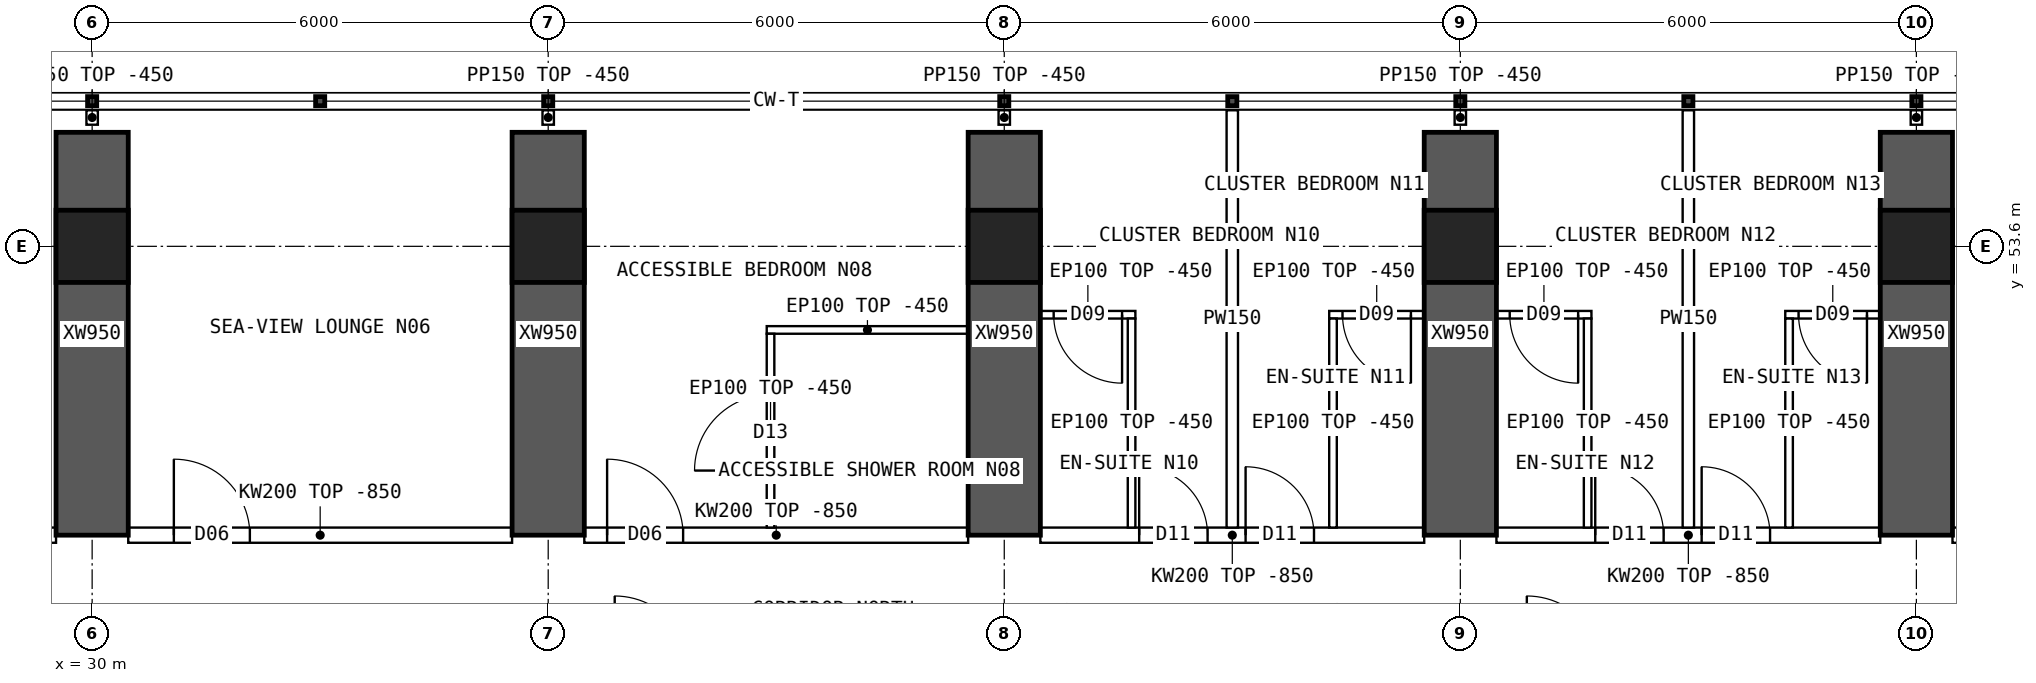
"""IFC4 building model, lengths in metres.
Left out: names, types, materials, properties, quantities, classifications, styles, units other than length and angle.
Written with IfcOpenShell. Run it as: python <this file> out.ifc"""

import sys

from ifc_helpers import new_model, si_unit, direction, frame, frame_2d, origin, origin_2d, place, context, subcontext, project, spatial, polyline, rectangle, hollow_rectangle, outline, extrude, element, fill, save


model = new_model("IFC4")
c1 = context("Model", 3, precision=1e-05, world=origin(), true_north=direction((0.0, 1.0)))
c2 = subcontext(c1, "Body", "Model", "MODEL_VIEW")
j1 = project(units=[si_unit("LENGTHUNIT", "METRE"), si_unit("PLANEANGLEUNIT", "RADIAN")], contexts=[c1])
p1 = place(None, origin())
s1 = spatial("IfcSite", under=j1, at=p1, CompositionType="ELEMENT")
p2 = place(p1, origin())
s2 = spatial("IfcBuilding", under=s1, at=p2, CompositionType="ELEMENT")
p3 = place(p2, frame((0.0, 0.0, 110.65)))
s3 = spatial("IfcBuildingStorey", under=s2, at=p3, CompositionType="ELEMENT", Elevation=110.65)
for number, where, z_axis, x_axis in (
    (1, (30.0, 53.6, 0.0), (0.0, 0.0, 1.0), (1.0, 0.0, 0.0)),
    (2, (36.0, 53.6, 0.0), (0.0, 0.0, 1.0), (1.0, 0.0, 0.0)),
    (3, (42.0, 53.6, 0.0), (0.0, 0.0, 1.0), (1.0, 0.0, 0.0)),
    (4, (48.0, 53.6, 0.0), (0.0, 0.0, 1.0), (1.0, 0.0, 0.0)),
    (5, (54.0, 53.6, 0.0), (0.0, 0.0, 1.0), (1.0, 0.0, 0.0)),
):
    element("IfcColumn", number, at=place(p3, frame(where, z_axis=z_axis, x_axis=x_axis)), inside=s3, PredefinedType="COLUMN", context=c2, shape_type="SweptSolid", body=[
        extrude(hollow_rectangle(XDim=0.95, YDim=0.95, WallThickness=0.095, at=origin_2d()), origin(), (0.0, 0.0, 1.0), 3.75),
    ])
for number, where, z_axis, x_axis in (
    (6, (30.0, 49.8, 0.0), (0.0, 0.0, 1.0), (0.0, 1.0, 0.0)),
    (7, (36.0, 49.8, 0.0), (0.0, 0.0, 1.0), (0.0, 1.0, 0.0)),
    (8, (42.0, 49.8, 0.0), (0.0, 0.0, 1.0), (0.0, 1.0, 0.0)),
    (9, (48.0, 49.8, 0.0), (0.0, 0.0, 1.0), (0.0, 1.0, 0.0)),
    (10, (54.0, 49.8, 0.0), (0.0, 0.0, 1.0), (0.0, 1.0, 0.0)),
):
    element("IfcWall", number, at=place(p3, frame(where, z_axis=z_axis, x_axis=x_axis)), inside=s3, PredefinedType="SHEAR", context=c2, shape_type="SweptSolid", body=[
        extrude(rectangle(XDim=5.3, YDim=0.95, at=frame_2d((2.65, 0.0))), origin(), (0.0, 0.0, 1.0), 3.75),
    ])
p4 = place(p3, frame((24.475, 49.8, 0.0), z_axis=(0.0, 0.0, 1.0), x_axis=(1.0, 0.0, 0.0)))
e11 = element("IfcWall", 11, at=p4, inside=s3, PredefinedType="SOLIDWALL", context=c2, shape_type="SweptSolid", body=[
    extrude(outline(polyline([(0.0, 0.0), (5.05, 0.0), (5.05, 2.9), (0.0, 2.9), (0.0, 0.0)])), frame((0.0, 0.1, 0.0), z_axis=(0.0, -1.0, 0.0), x_axis=(1.0, 0.0, 0.0)), (0.0, 0.0, 1.0), 0.2),
])
p5 = place(p4, frame((0.6, 0.0, 0.0)))
e12 = element("IfcOpeningElement", 12, at=p5, cuts=e11, PredefinedType="OPENING", context=c2, shape_type="SweptSolid", body=[
    extrude(rectangle(XDim=1.0, YDim=2.1, at=frame_2d((0.5, 1.05))), frame((0.0, 0.11, 0.0), z_axis=(0.0, -1.0, 0.0), x_axis=(1.0, 0.0, 0.0)), (0.0, 0.0, 1.0), 0.22),
])
p6 = place(p3, frame((30.475, 49.8, 0.0), z_axis=(0.0, 0.0, 1.0), x_axis=(1.0, 0.0, 0.0)))
e13 = element("IfcWall", 13, at=p6, inside=s3, PredefinedType="SOLIDWALL", context=c2, shape_type="SweptSolid", body=[
    extrude(outline(polyline([(0.0, 0.0), (5.05, 0.0), (5.05, 2.9), (0.0, 2.9), (0.0, 0.0)])), frame((0.0, 0.1, 0.0), z_axis=(0.0, -1.0, 0.0), x_axis=(1.0, 0.0, 0.0)), (0.0, 0.0, 1.0), 0.2),
])
p7 = place(p6, frame((0.6, 0.0, 0.0)))
e14 = element("IfcOpeningElement", 14, at=p7, cuts=e13, PredefinedType="OPENING", context=c2, shape_type="SweptSolid", body=[
    extrude(rectangle(XDim=1.0, YDim=2.1, at=frame_2d((0.5, 1.05))), frame((0.0, 0.11, 0.0), z_axis=(0.0, -1.0, 0.0), x_axis=(1.0, 0.0, 0.0)), (0.0, 0.0, 1.0), 0.22),
])
p8 = place(p3, frame((36.475, 49.8, 0.0), z_axis=(0.0, 0.0, 1.0), x_axis=(1.0, 0.0, 0.0)))
e15 = element("IfcWall", 15, at=p8, inside=s3, PredefinedType="SOLIDWALL", context=c2, shape_type="SweptSolid", body=[
    extrude(outline(polyline([(0.0, 0.0), (5.05, 0.0), (5.05, 2.9), (0.0, 2.9), (0.0, 0.0)])), frame((0.0, 0.1, 0.0), z_axis=(0.0, -1.0, 0.0), x_axis=(1.0, 0.0, 0.0)), (0.0, 0.0, 1.0), 0.2),
])
p9 = place(p8, frame((0.3, 0.0, 0.0)))
e16 = element("IfcOpeningElement", 16, at=p9, cuts=e15, PredefinedType="OPENING", context=c2, shape_type="SweptSolid", body=[
    extrude(rectangle(XDim=1.0, YDim=2.1, at=frame_2d((0.5, 1.05))), frame((0.0, 0.11, 0.0), z_axis=(0.0, -1.0, 0.0), x_axis=(1.0, 0.0, 0.0)), (0.0, 0.0, 1.0), 0.22),
])
p10 = place(p3, frame((42.475, 49.8, 0.0), z_axis=(0.0, 0.0, 1.0), x_axis=(1.0, 0.0, 0.0)))
e17 = element("IfcWall", 17, at=p10, inside=s3, PredefinedType="SOLIDWALL", context=c2, shape_type="SweptSolid", body=[
    extrude(outline(polyline([(0.0, 0.0), (5.05, 0.0), (5.05, 2.9), (0.0, 2.9), (0.0, 0.0)])), frame((0.0, 0.1, 0.0), z_axis=(0.0, -1.0, 0.0), x_axis=(1.0, 0.0, 0.0)), (0.0, 0.0, 1.0), 0.2),
])
p11 = place(p10, frame((1.3, 0.0, 0.0)))
e18 = element("IfcOpeningElement", 18, at=p11, cuts=e17, PredefinedType="OPENING", context=c2, shape_type="SweptSolid", body=[
    extrude(rectangle(XDim=0.9, YDim=2.1, at=frame_2d((0.45, 1.05))), frame((0.0, 0.11, 0.0), z_axis=(0.0, -1.0, 0.0), x_axis=(1.0, 0.0, 0.0)), (0.0, 0.0, 1.0), 0.22),
])
p12 = place(p10, frame((2.7, 0.0, 0.0)))
e19 = element("IfcOpeningElement", 19, at=p12, cuts=e17, PredefinedType="OPENING", context=c2, shape_type="SweptSolid", body=[
    extrude(rectangle(XDim=0.9, YDim=2.1, at=frame_2d((0.45, 1.05))), frame((0.0, 0.11, 0.0), z_axis=(0.0, -1.0, 0.0), x_axis=(1.0, 0.0, 0.0)), (0.0, 0.0, 1.0), 0.22),
])
p13 = place(p3, frame((48.475, 49.8, 0.0), z_axis=(0.0, 0.0, 1.0), x_axis=(1.0, 0.0, 0.0)))
e20 = element("IfcWall", 20, at=p13, inside=s3, PredefinedType="SOLIDWALL", context=c2, shape_type="SweptSolid", body=[
    extrude(outline(polyline([(0.0, 0.0), (5.05, 0.0), (5.05, 2.9), (0.0, 2.9), (0.0, 0.0)])), frame((0.0, 0.1, 0.0), z_axis=(0.0, -1.0, 0.0), x_axis=(1.0, 0.0, 0.0)), (0.0, 0.0, 1.0), 0.2),
])
p14 = place(p13, frame((1.3, 0.0, 0.0)))
e21 = element("IfcOpeningElement", 21, at=p14, cuts=e20, PredefinedType="OPENING", context=c2, shape_type="SweptSolid", body=[
    extrude(rectangle(XDim=0.9, YDim=2.1, at=frame_2d((0.45, 1.05))), frame((0.0, 0.11, 0.0), z_axis=(0.0, -1.0, 0.0), x_axis=(1.0, 0.0, 0.0)), (0.0, 0.0, 1.0), 0.22),
])
p15 = place(p13, frame((2.7, 0.0, 0.0)))
e22 = element("IfcOpeningElement", 22, at=p15, cuts=e20, PredefinedType="OPENING", context=c2, shape_type="SweptSolid", body=[
    extrude(rectangle(XDim=0.9, YDim=2.1, at=frame_2d((0.45, 1.05))), frame((0.0, 0.11, 0.0), z_axis=(0.0, -1.0, 0.0), x_axis=(1.0, 0.0, 0.0)), (0.0, 0.0, 1.0), 0.22),
])
p16 = place(p3, frame((54.475, 49.8, 0.0), z_axis=(0.0, 0.0, 1.0), x_axis=(1.0, 0.0, 0.0)))
e23 = element("IfcWall", 23, at=p16, inside=s3, PredefinedType="SOLIDWALL", context=c2, shape_type="SweptSolid", body=[
    extrude(outline(polyline([(0.0, 0.0), (5.05, 0.0), (5.05, 2.9), (0.0, 2.9), (0.0, 0.0)])), frame((0.0, 0.1, 0.0), z_axis=(0.0, -1.0, 0.0), x_axis=(1.0, 0.0, 0.0)), (0.0, 0.0, 1.0), 0.2),
])
p17 = place(p16, frame((0.6, 0.0, 0.0)))
e24 = element("IfcOpeningElement", 24, at=p17, cuts=e23, PredefinedType="OPENING", context=c2, shape_type="SweptSolid", body=[
    extrude(rectangle(XDim=1.0, YDim=2.1, at=frame_2d((0.5, 1.05))), frame((0.0, 0.11, 0.0), z_axis=(0.0, -1.0, 0.0), x_axis=(1.0, 0.0, 0.0)), (0.0, 0.0, 1.0), 0.22),
])
p18 = place(p3, frame((38.875, 52.5, 0.0), z_axis=(0.0, 0.0, 1.0), x_axis=(1.0, 0.0, 0.0)))
e25 = element("IfcWall", 25, at=p18, inside=s3, PredefinedType="PARTITIONING", context=c2, shape_type="SweptSolid", body=[
    extrude(rectangle(XDim=2.65, YDim=0.1, at=frame_2d((1.325, 0.0))), origin(), (0.0, 0.0, 1.0), 3.3),
])
p19 = place(p3, frame((38.925, 52.45, 0.0), z_axis=(0.0, 0.0, 1.0), x_axis=(0.0, -1.0, 0.0)))
e26 = element("IfcWall", 26, at=p19, inside=s3, PredefinedType="PARTITIONING", context=c2, shape_type="SweptSolid", body=[
    extrude(outline(polyline([(0.0, 0.0), (2.55, 0.0), (2.55, 2.9), (2.502, 2.9), (2.5, 3.3), (0.0, 3.3), (0.0, 0.0)])), frame((0.0, 0.05, 0.0), z_axis=(0.0, -1.0, 0.0), x_axis=(1.0, 0.0, 0.0)), (0.0, 0.0, 1.0), 0.1),
])
p20 = place(p19, frame((0.8, 0.0, 0.0)))
e27 = element("IfcOpeningElement", 27, at=p20, cuts=e26, PredefinedType="OPENING", context=c2, shape_type="SweptSolid", body=[
    extrude(rectangle(XDim=1.0, YDim=2.1, at=frame_2d((0.5, 1.05))), frame((0.0, 0.06, 0.0), z_axis=(0.0, -1.0, 0.0), x_axis=(1.0, 0.0, 0.0)), (0.0, 0.0, 1.0), 0.12),
])
p21 = place(p3, frame((45.0, 55.39, 0.0), z_axis=(0.0, 0.0, 1.0), x_axis=(0.0, -1.0, 0.0)))
e28 = element("IfcWall", 28, at=p21, inside=s3, PredefinedType="PARTITIONING", context=c2, shape_type="SweptSolid", body=[
    extrude(outline(polyline([(0.0, 0.0), (5.49, 0.0), (5.49, 2.9), (5.442, 2.9), (5.44, 3.3), (1.992, 3.3), (1.99, 2.9), (1.592, 2.9), (1.59, 3.3), (0.0, 3.3), (0.0, 0.0)])), frame((0.0, 0.075, 0.0), z_axis=(0.0, -1.0, 0.0), x_axis=(1.0, 0.0, 0.0)), (0.0, 0.0, 1.0), 0.15),
])
p22 = place(p3, frame((42.475, 52.7, 0.0), z_axis=(0.0, 0.0, 1.0), x_axis=(1.0, 0.0, 0.0)))
e29 = element("IfcWall", 29, at=p22, inside=s3, PredefinedType="PARTITIONING", context=c2, shape_type="SweptSolid", body=[
    extrude(rectangle(XDim=1.25, YDim=0.1, at=frame_2d((0.625, 0.0))), origin(), (0.0, 0.0, 1.0), 3.3),
])
p23 = place(p22, frame((0.175, 0.0, 0.0)))
e30 = element("IfcOpeningElement", 30, at=p23, cuts=e29, PredefinedType="OPENING", context=c2, shape_type="SweptSolid", body=[
    extrude(rectangle(XDim=0.9, YDim=2.1, at=frame_2d((0.45, 1.05))), frame((0.0, 0.06, 0.0), z_axis=(0.0, -1.0, 0.0), x_axis=(1.0, 0.0, 0.0)), (0.0, 0.0, 1.0), 0.12),
])
p24 = place(p3, frame((43.675, 52.65, 0.0), z_axis=(0.0, 0.0, 1.0), x_axis=(0.0, -1.0, 0.0)))
e31 = element("IfcWall", 31, at=p24, inside=s3, PredefinedType="PARTITIONING", context=c2, shape_type="SweptSolid", body=[
    extrude(outline(polyline([(0.0, 0.0), (2.75, 0.0), (2.75, 2.9), (2.702, 2.9), (2.7, 3.3), (0.0, 3.3), (0.0, 0.0)])), frame((0.0, 0.05, 0.0), z_axis=(0.0, -1.0, 0.0), x_axis=(1.0, 0.0, 0.0)), (0.0, 0.0, 1.0), 0.1),
])
p25 = place(p3, frame((46.275, 52.7, 0.0), z_axis=(0.0, 0.0, 1.0), x_axis=(1.0, 0.0, 0.0)))
e32 = element("IfcWall", 32, at=p25, inside=s3, PredefinedType="PARTITIONING", context=c2, shape_type="SweptSolid", body=[
    extrude(rectangle(XDim=1.25, YDim=0.1, at=frame_2d((0.625, 0.0))), origin(), (0.0, 0.0, 1.0), 3.3),
])
p26 = place(p25, frame((0.175, 0.0, 0.0)))
e33 = element("IfcOpeningElement", 33, at=p26, cuts=e32, PredefinedType="OPENING", context=c2, shape_type="SweptSolid", body=[
    extrude(rectangle(XDim=0.9, YDim=2.1, at=frame_2d((0.45, 1.05))), frame((0.0, 0.06, 0.0), z_axis=(0.0, -1.0, 0.0), x_axis=(1.0, 0.0, 0.0)), (0.0, 0.0, 1.0), 0.12),
])
p27 = place(p3, frame((46.325, 52.65, 0.0), z_axis=(0.0, 0.0, 1.0), x_axis=(0.0, -1.0, 0.0)))
e34 = element("IfcWall", 34, at=p27, inside=s3, PredefinedType="PARTITIONING", context=c2, shape_type="SweptSolid", body=[
    extrude(outline(polyline([(0.0, 0.0), (2.75, 0.0), (2.75, 2.9), (2.702, 2.9), (2.7, 3.3), (0.0, 3.3), (0.0, 0.0)])), frame((0.0, 0.05, 0.0), z_axis=(0.0, -1.0, 0.0), x_axis=(1.0, 0.0, 0.0)), (0.0, 0.0, 1.0), 0.1),
])
p28 = place(p3, frame((51.0, 55.39, 0.0), z_axis=(0.0, 0.0, 1.0), x_axis=(0.0, -1.0, 0.0)))
e35 = element("IfcWall", 35, at=p28, inside=s3, PredefinedType="PARTITIONING", context=c2, shape_type="SweptSolid", body=[
    extrude(outline(polyline([(0.0, 0.0), (5.49, 0.0), (5.49, 2.9), (5.442, 2.9), (5.44, 3.3), (1.992, 3.3), (1.99, 2.9), (1.592, 2.9), (1.59, 3.3), (0.0, 3.3), (0.0, 0.0)])), frame((0.0, 0.075, 0.0), z_axis=(0.0, -1.0, 0.0), x_axis=(1.0, 0.0, 0.0)), (0.0, 0.0, 1.0), 0.15),
])
p29 = place(p3, frame((48.475, 52.7, 0.0), z_axis=(0.0, 0.0, 1.0), x_axis=(1.0, 0.0, 0.0)))
e36 = element("IfcWall", 36, at=p29, inside=s3, PredefinedType="PARTITIONING", context=c2, shape_type="SweptSolid", body=[
    extrude(rectangle(XDim=1.25, YDim=0.1, at=frame_2d((0.625, 0.0))), origin(), (0.0, 0.0, 1.0), 3.3),
])
p30 = place(p29, frame((0.175, 0.0, 0.0)))
e37 = element("IfcOpeningElement", 37, at=p30, cuts=e36, PredefinedType="OPENING", context=c2, shape_type="SweptSolid", body=[
    extrude(rectangle(XDim=0.9, YDim=2.1, at=frame_2d((0.45, 1.05))), frame((0.0, 0.06, 0.0), z_axis=(0.0, -1.0, 0.0), x_axis=(1.0, 0.0, 0.0)), (0.0, 0.0, 1.0), 0.12),
])
p31 = place(p3, frame((49.675, 52.65, 0.0), z_axis=(0.0, 0.0, 1.0), x_axis=(0.0, -1.0, 0.0)))
e38 = element("IfcWall", 38, at=p31, inside=s3, PredefinedType="PARTITIONING", context=c2, shape_type="SweptSolid", body=[
    extrude(outline(polyline([(0.0, 0.0), (2.75, 0.0), (2.75, 2.9), (2.702, 2.9), (2.7, 3.3), (0.0, 3.3), (0.0, 0.0)])), frame((0.0, 0.05, 0.0), z_axis=(0.0, -1.0, 0.0), x_axis=(1.0, 0.0, 0.0)), (0.0, 0.0, 1.0), 0.1),
])
p32 = place(p3, frame((52.275, 52.7, 0.0), z_axis=(0.0, 0.0, 1.0), x_axis=(1.0, 0.0, 0.0)))
e39 = element("IfcWall", 39, at=p32, inside=s3, PredefinedType="PARTITIONING", context=c2, shape_type="SweptSolid", body=[
    extrude(rectangle(XDim=1.25, YDim=0.1, at=frame_2d((0.625, 0.0))), origin(), (0.0, 0.0, 1.0), 3.3),
])
p33 = place(p32, frame((0.175, 0.0, 0.0)))
e40 = element("IfcOpeningElement", 40, at=p33, cuts=e39, PredefinedType="OPENING", context=c2, shape_type="SweptSolid", body=[
    extrude(rectangle(XDim=0.9, YDim=2.1, at=frame_2d((0.45, 1.05))), frame((0.0, 0.06, 0.0), z_axis=(0.0, -1.0, 0.0), x_axis=(1.0, 0.0, 0.0)), (0.0, 0.0, 1.0), 0.12),
])
p34 = place(p3, frame((52.325, 52.65, 0.0), z_axis=(0.0, 0.0, 1.0), x_axis=(0.0, -1.0, 0.0)))
e41 = element("IfcWall", 41, at=p34, inside=s3, PredefinedType="PARTITIONING", context=c2, shape_type="SweptSolid", body=[
    extrude(outline(polyline([(0.0, 0.0), (2.75, 0.0), (2.75, 2.9), (2.702, 2.9), (2.7, 3.3), (0.0, 3.3), (0.0, 0.0)])), frame((0.0, 0.05, 0.0), z_axis=(0.0, -1.0, 0.0), x_axis=(1.0, 0.0, 0.0)), (0.0, 0.0, 1.0), 0.1),
])
for number, where, z_axis, x_axis in (
    (42, (30.0, 55.2, 0.0), (0.0, 0.0, 1.0), (0.0, 1.0, 0.0)),
    (43, (36.0, 55.2, 0.0), (0.0, 0.0, 1.0), (0.0, 1.0, 0.0)),
    (44, (42.0, 55.2, 0.0), (0.0, 0.0, 1.0), (0.0, 1.0, 0.0)),
    (45, (48.0, 55.2, 0.0), (0.0, 0.0, 1.0), (0.0, 1.0, 0.0)),
    (46, (54.0, 55.2, 0.0), (0.0, 0.0, 1.0), (0.0, 1.0, 0.0)),
):
    element("IfcWall", number, at=place(p3, frame(where, z_axis=z_axis, x_axis=x_axis)), inside=s3, PredefinedType="PARTITIONING", context=c2, shape_type="SweptSolid", body=[
        extrude(rectangle(XDim=0.19, YDim=0.15, at=frame_2d((0.095, 0.0))), origin(), (0.0, 0.0, 1.0), 3.3),
    ])
p35 = place(p7, origin())
e47 = element("IfcDoor", 47, at=p35, inside=s3, OperationType="SINGLE_SWING_LEFT", PredefinedType="DOOR", context=c2, shape_type="SweptSolid", body=[
    extrude(rectangle(XDim=1.0, YDim=2.1, at=frame_2d((0.5, 1.05))), frame((0.0, 0.025, 0.0), z_axis=(0.0, -1.0, 0.0), x_axis=(1.0, 0.0, 0.0)), (0.0, 0.0, 1.0), 0.05),
])
fill(e14, e47)
p36 = place(p20, origin())
e48 = element("IfcDoor", 48, at=p36, inside=s3, OperationType="SINGLE_SWING_RIGHT", PredefinedType="DOOR", context=c2, shape_type="SweptSolid", body=[
    extrude(rectangle(XDim=1.0, YDim=2.1, at=frame_2d((0.5, 1.05))), frame((0.0, 0.025, 0.0), z_axis=(0.0, -1.0, 0.0), x_axis=(1.0, 0.0, 0.0)), (0.0, 0.0, 1.0), 0.05),
])
fill(e27, e48)
p37 = place(p9, origin())
e49 = element("IfcDoor", 49, at=p37, inside=s3, OperationType="SINGLE_SWING_LEFT", PredefinedType="DOOR", context=c2, shape_type="SweptSolid", body=[
    extrude(rectangle(XDim=1.0, YDim=2.1, at=frame_2d((0.5, 1.05))), frame((0.0, 0.025, 0.0), z_axis=(0.0, -1.0, 0.0), x_axis=(1.0, 0.0, 0.0)), (0.0, 0.0, 1.0), 0.05),
])
fill(e16, e49)
p38 = place(p23, origin())
e50 = element("IfcDoor", 50, at=p38, inside=s3, OperationType="SINGLE_SWING_RIGHT", PredefinedType="DOOR", context=c2, shape_type="SweptSolid", body=[
    extrude(rectangle(XDim=0.9, YDim=2.1, at=frame_2d((0.45, 1.05))), frame((0.0, 0.025, 0.0), z_axis=(0.0, -1.0, 0.0), x_axis=(1.0, 0.0, 0.0)), (0.0, 0.0, 1.0), 0.05),
])
fill(e30, e50)
p39 = place(p11, origin())
e51 = element("IfcDoor", 51, at=p39, inside=s3, OperationType="SINGLE_SWING_LEFT", PredefinedType="DOOR", context=c2, shape_type="SweptSolid", body=[
    extrude(rectangle(XDim=0.9, YDim=2.1, at=frame_2d((0.45, 1.05))), frame((0.0, 0.025, 0.0), z_axis=(0.0, -1.0, 0.0), x_axis=(1.0, 0.0, 0.0)), (0.0, 0.0, 1.0), 0.05),
])
fill(e18, e51)
p40 = place(p26, origin())
e52 = element("IfcDoor", 52, at=p40, inside=s3, OperationType="SINGLE_SWING_RIGHT", PredefinedType="DOOR", context=c2, shape_type="SweptSolid", body=[
    extrude(rectangle(XDim=0.9, YDim=2.1, at=frame_2d((0.45, 1.05))), frame((0.0, 0.025, 0.0), z_axis=(0.0, -1.0, 0.0), x_axis=(1.0, 0.0, 0.0)), (0.0, 0.0, 1.0), 0.05),
])
fill(e33, e52)
p41 = place(p12, origin())
e53 = element("IfcDoor", 53, at=p41, inside=s3, OperationType="SINGLE_SWING_LEFT", PredefinedType="DOOR", context=c2, shape_type="SweptSolid", body=[
    extrude(rectangle(XDim=0.9, YDim=2.1, at=frame_2d((0.45, 1.05))), frame((0.0, 0.025, 0.0), z_axis=(0.0, -1.0, 0.0), x_axis=(1.0, 0.0, 0.0)), (0.0, 0.0, 1.0), 0.05),
])
fill(e19, e53)
p42 = place(p30, origin())
e54 = element("IfcDoor", 54, at=p42, inside=s3, OperationType="SINGLE_SWING_RIGHT", PredefinedType="DOOR", context=c2, shape_type="SweptSolid", body=[
    extrude(rectangle(XDim=0.9, YDim=2.1, at=frame_2d((0.45, 1.05))), frame((0.0, 0.025, 0.0), z_axis=(0.0, -1.0, 0.0), x_axis=(1.0, 0.0, 0.0)), (0.0, 0.0, 1.0), 0.05),
])
fill(e37, e54)
p43 = place(p14, origin())
e55 = element("IfcDoor", 55, at=p43, inside=s3, OperationType="SINGLE_SWING_LEFT", PredefinedType="DOOR", context=c2, shape_type="SweptSolid", body=[
    extrude(rectangle(XDim=0.9, YDim=2.1, at=frame_2d((0.45, 1.05))), frame((0.0, 0.025, 0.0), z_axis=(0.0, -1.0, 0.0), x_axis=(1.0, 0.0, 0.0)), (0.0, 0.0, 1.0), 0.05),
])
fill(e21, e55)
p44 = place(p33, origin())
e56 = element("IfcDoor", 56, at=p44, inside=s3, OperationType="SINGLE_SWING_RIGHT", PredefinedType="DOOR", context=c2, shape_type="SweptSolid", body=[
    extrude(rectangle(XDim=0.9, YDim=2.1, at=frame_2d((0.45, 1.05))), frame((0.0, 0.025, 0.0), z_axis=(0.0, -1.0, 0.0), x_axis=(1.0, 0.0, 0.0)), (0.0, 0.0, 1.0), 0.05),
])
fill(e40, e56)
p45 = place(p15, origin())
e57 = element("IfcDoor", 57, at=p45, inside=s3, OperationType="SINGLE_SWING_LEFT", PredefinedType="DOOR", context=c2, shape_type="SweptSolid", body=[
    extrude(rectangle(XDim=0.9, YDim=2.1, at=frame_2d((0.45, 1.05))), frame((0.0, 0.025, 0.0), z_axis=(0.0, -1.0, 0.0), x_axis=(1.0, 0.0, 0.0)), (0.0, 0.0, 1.0), 0.05),
])
fill(e22, e57)
save(model, sys.argv[1])
